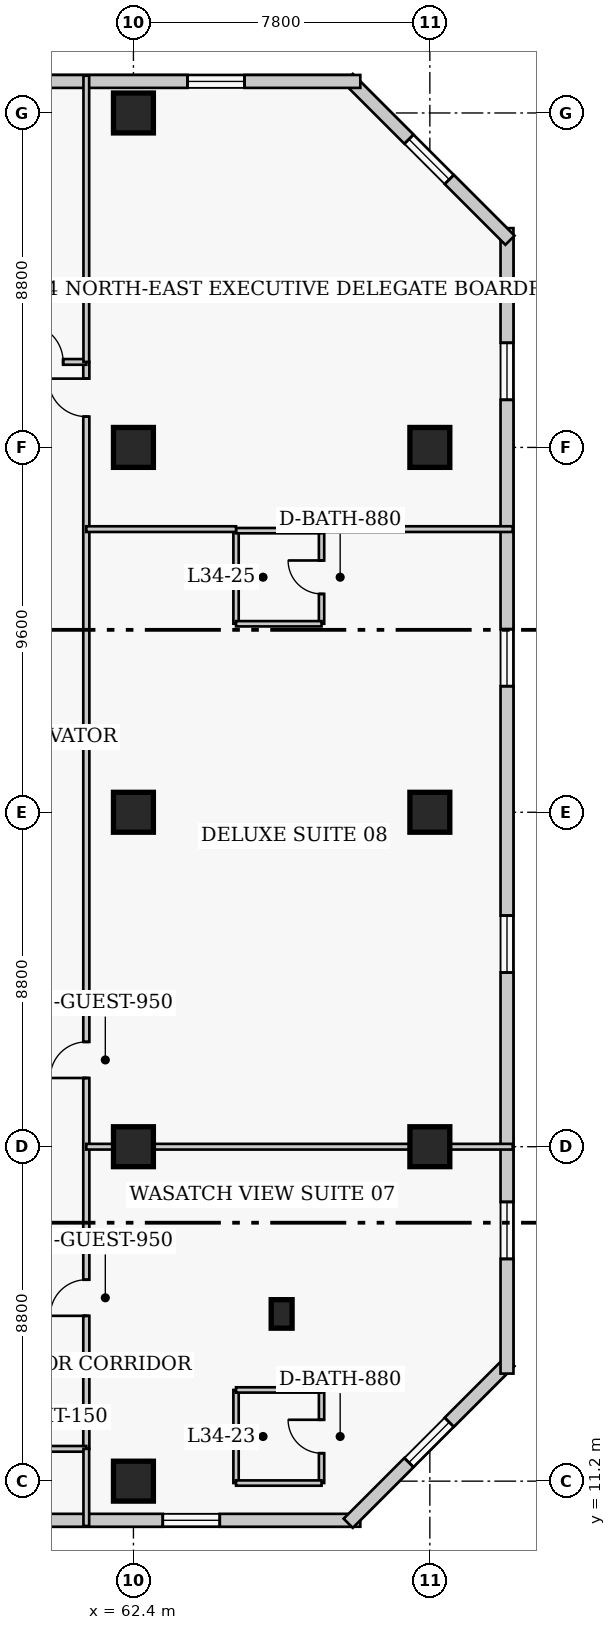
"""IFC4 building model, lengths in metres.
Left out: names, types, materials, properties, quantities, classifications, styles, units other than length and angle.
Written with IfcOpenShell. Run it as: python <this file> out.ifc"""

import sys

from ifc_helpers import new_model, si_unit, direction, frame, frame_2d, origin, origin_2d, place, context, subcontext, project, spatial, rectangle, extrude, element, fill, save


model = new_model("IFC4")
c1 = context("Model", 3, precision=1e-05, world=origin(), true_north=direction((0.0, 1.0)))
c2 = subcontext(c1, "Body", "Model", "MODEL_VIEW")
j1 = project(units=[si_unit("LENGTHUNIT", "METRE"), si_unit("PLANEANGLEUNIT", "RADIAN")], contexts=[c1])
p1 = place(None, origin())
s1 = spatial("IfcSite", under=j1, at=p1, CompositionType="ELEMENT")
p2 = place(p1, origin())
s2 = spatial("IfcBuilding", under=s1, at=p2, CompositionType="ELEMENT")
p3 = place(p2, frame((0.0, 0.0, 138.4)))
s3 = spatial("IfcBuildingStorey", under=s2, at=p3, CompositionType="ELEMENT", Elevation=138.4)
for number, where, z_axis, x_axis in (
    (1, (62.4, 11.2, 0.0), (0.0, 0.0, 1.0), (1.0, 0.0, 0.0)),
    (2, (62.4, 20.0, 0.0), (0.0, 0.0, 1.0), (1.0, 0.0, 0.0)),
    (3, (62.4, 28.8, 0.0), (0.0, 0.0, 1.0), (1.0, 0.0, 0.0)),
    (4, (62.4, 38.4, 0.0), (0.0, 0.0, 1.0), (1.0, 0.0, 0.0)),
    (5, (62.4, 47.2, 0.0), (0.0, 0.0, 1.0), (1.0, 0.0, 0.0)),
    (6, (70.2, 20.0, 0.0), (0.0, 0.0, 1.0), (1.0, 0.0, 0.0)),
    (7, (70.2, 28.8, 0.0), (0.0, 0.0, 1.0), (1.0, 0.0, 0.0)),
    (8, (70.2, 38.4, 0.0), (0.0, 0.0, 1.0), (1.0, 0.0, 0.0)),
):
    element("IfcColumn", number, at=place(p3, frame(where, z_axis=z_axis, x_axis=x_axis)), inside=s3, PredefinedType="COLUMN", context=c2, shape_type="SweptSolid", body=[
        extrude(rectangle(XDim=1.05, YDim=1.05, at=origin_2d()), origin(), (0.0, 0.0, 1.0), 3.8),
    ])
p4 = place(p3, frame((66.3, 15.6, 0.0), z_axis=(0.0, 0.0, 1.0), x_axis=(1.0, 0.0, 0.0)))
e9 = element("IfcColumn", 9, at=p4, inside=s3, PredefinedType="PILASTER", context=c2, shape_type="SweptSolid", body=[
    extrude(rectangle(XDim=0.55, YDim=0.75, at=origin_2d()), origin(), (0.0, 0.0, 1.0), 3.8),
])
p5 = place(p3, frame((41.68, 10.17, 0.0), z_axis=(0.0, 0.0, 1.0), x_axis=(1.0, 0.0, 0.0)))
e10 = element("IfcWall", 10, at=p5, inside=s3, PredefinedType="SOLIDWALL", context=c2, shape_type="SweptSolid", body=[
    extrude(rectangle(XDim=26.69, YDim=0.34, at=frame_2d((13.345, 0.0))), origin(), (0.0, 0.0, 1.0), 3.55),
])
p6 = place(p5, frame((2.548, 0.0, 0.85)))
e11 = element("IfcOpeningElement", 11, at=p6, cuts=e10, PredefinedType="OPENING", context=c2, shape_type="SweptSolid", body=[
    extrude(rectangle(XDim=1.5, YDim=1.75, at=frame_2d((0.75, 0.875))), frame((0.0, 0.18, 0.0), z_axis=(0.0, -1.0, 0.0), x_axis=(1.0, 0.0, 0.0)), (0.0, 0.0, 1.0), 0.36),
])
p7 = place(p5, frame((13.745, 0.0, 0.85)))
e12 = element("IfcOpeningElement", 12, at=p7, cuts=e10, PredefinedType="OPENING", context=c2, shape_type="SweptSolid", body=[
    extrude(rectangle(XDim=1.5, YDim=1.75, at=frame_2d((0.75, 0.875))), frame((0.0, 0.18, 0.0), z_axis=(0.0, -1.0, 0.0), x_axis=(1.0, 0.0, 0.0)), (0.0, 0.0, 1.0), 0.36),
])
p8 = place(p5, frame((21.492, 0.0, 0.85)))
e13 = element("IfcOpeningElement", 13, at=p8, cuts=e10, PredefinedType="OPENING", context=c2, shape_type="SweptSolid", body=[
    extrude(rectangle(XDim=1.5, YDim=1.75, at=frame_2d((0.75, 0.875))), frame((0.0, 0.18, 0.0), z_axis=(0.0, -1.0, 0.0), x_axis=(1.0, 0.0, 0.0)), (0.0, 0.0, 1.0), 0.36),
])
p9 = place(p3, frame((68.052, 10.092, 0.0), z_axis=(0.0, 0.0, 1.0), x_axis=(0.707106781187, 0.707106781187, 0.0)))
e14 = element("IfcWall", 14, at=p9, inside=s3, PredefinedType="SOLIDWALL", context=c2, shape_type="SweptSolid", body=[
    extrude(rectangle(XDim=6.02, YDim=0.34, at=frame_2d((3.01, 0.0))), origin(), (0.0, 0.0, 1.0), 3.55),
])
p10 = place(p9, frame((2.26, 0.0, 0.85)))
e15 = element("IfcOpeningElement", 15, at=p10, cuts=e14, PredefinedType="OPENING", context=c2, shape_type="SweptSolid", body=[
    extrude(rectangle(XDim=1.5, YDim=1.75, at=frame_2d((0.75, 0.875))), frame((0.0, 0.18, 0.0), z_axis=(0.0, -1.0, 0.0), x_axis=(1.0, 0.0, 0.0)), (0.0, 0.0, 1.0), 0.36),
])
p11 = place(p3, frame((72.23, 14.03, 0.0), z_axis=(0.0, 0.0, 1.0), x_axis=(0.0, 1.0, 0.0)))
e16 = element("IfcWall", 16, at=p11, inside=s3, PredefinedType="SOLIDWALL", context=c2, shape_type="SweptSolid", body=[
    extrude(rectangle(XDim=30.14, YDim=0.34, at=frame_2d((15.07, 0.0))), origin(), (0.0, 0.0, 1.0), 3.55),
])
p12 = place(p11, frame((3.018, 0.0, 0.85)))
e17 = element("IfcOpeningElement", 17, at=p12, cuts=e16, PredefinedType="OPENING", context=c2, shape_type="SweptSolid", body=[
    extrude(rectangle(XDim=1.5, YDim=1.75, at=frame_2d((0.75, 0.875))), frame((0.0, 0.18, 0.0), z_axis=(0.0, -1.0, 0.0), x_axis=(1.0, 0.0, 0.0)), (0.0, 0.0, 1.0), 0.36),
])
p13 = place(p11, frame((10.552, 0.0, 0.85)))
e18 = element("IfcOpeningElement", 18, at=p13, cuts=e16, PredefinedType="OPENING", context=c2, shape_type="SweptSolid", body=[
    extrude(rectangle(XDim=1.5, YDim=1.75, at=frame_2d((0.75, 0.875))), frame((0.0, 0.18, 0.0), z_axis=(0.0, -1.0, 0.0), x_axis=(1.0, 0.0, 0.0)), (0.0, 0.0, 1.0), 0.36),
])
p14 = place(p11, frame((18.087, 0.0, 0.85)))
e19 = element("IfcOpeningElement", 19, at=p14, cuts=e16, PredefinedType="OPENING", context=c2, shape_type="SweptSolid", body=[
    extrude(rectangle(XDim=1.5, YDim=1.75, at=frame_2d((0.75, 0.875))), frame((0.0, 0.18, 0.0), z_axis=(0.0, -1.0, 0.0), x_axis=(1.0, 0.0, 0.0)), (0.0, 0.0, 1.0), 0.36),
])
p15 = place(p11, frame((25.623, 0.0, 0.85)))
e20 = element("IfcOpeningElement", 20, at=p15, cuts=e16, PredefinedType="OPENING", context=c2, shape_type="SweptSolid", body=[
    extrude(rectangle(XDim=1.5, YDim=1.75, at=frame_2d((0.75, 0.875))), frame((0.0, 0.18, 0.0), z_axis=(0.0, -1.0, 0.0), x_axis=(1.0, 0.0, 0.0)), (0.0, 0.0, 1.0), 0.36),
])
p16 = place(p3, frame((72.308, 43.852, 0.0), z_axis=(0.0, 0.0, 1.0), x_axis=(-0.707106781187, 0.707106781187, 0.0)))
e21 = element("IfcWall", 21, at=p16, inside=s3, PredefinedType="SOLIDWALL", context=c2, shape_type="SweptSolid", body=[
    extrude(rectangle(XDim=6.02, YDim=0.34, at=frame_2d((3.01, 0.0))), origin(), (0.0, 0.0, 1.0), 3.55),
])
p17 = place(p16, frame((2.26, 0.0, 0.85)))
e22 = element("IfcOpeningElement", 22, at=p17, cuts=e21, PredefinedType="OPENING", context=c2, shape_type="SweptSolid", body=[
    extrude(rectangle(XDim=1.5, YDim=1.75, at=frame_2d((0.75, 0.875))), frame((0.0, 0.18, 0.0), z_axis=(0.0, -1.0, 0.0), x_axis=(1.0, 0.0, 0.0)), (0.0, 0.0, 1.0), 0.36),
])
p18 = place(p3, frame((68.37, 48.03, 0.0), z_axis=(0.0, 0.0, 1.0), x_axis=(-1.0, 0.0, 0.0)))
e23 = element("IfcWall", 23, at=p18, inside=s3, PredefinedType="SOLIDWALL", context=c2, shape_type="SweptSolid", body=[
    extrude(rectangle(XDim=26.69, YDim=0.34, at=frame_2d((13.345, 0.0))), origin(), (0.0, 0.0, 1.0), 3.55),
])
p19 = place(p18, frame((3.048, 0.0, 0.85)))
e24 = element("IfcOpeningElement", 24, at=p19, cuts=e23, PredefinedType="OPENING", context=c2, shape_type="SweptSolid", body=[
    extrude(rectangle(XDim=1.5, YDim=1.75, at=frame_2d((0.75, 0.875))), frame((0.0, 0.18, 0.0), z_axis=(0.0, -1.0, 0.0), x_axis=(1.0, 0.0, 0.0)), (0.0, 0.0, 1.0), 0.36),
])
p20 = place(p18, frame((11.445, 0.0, 0.85)))
e25 = element("IfcOpeningElement", 25, at=p20, cuts=e23, PredefinedType="OPENING", context=c2, shape_type="SweptSolid", body=[
    extrude(rectangle(XDim=1.5, YDim=1.75, at=frame_2d((0.75, 0.875))), frame((0.0, 0.18, 0.0), z_axis=(0.0, -1.0, 0.0), x_axis=(1.0, 0.0, 0.0)), (0.0, 0.0, 1.0), 0.36),
])
p21 = place(p18, frame((22.642, 0.0, 0.85)))
e26 = element("IfcOpeningElement", 26, at=p21, cuts=e23, PredefinedType="OPENING", context=c2, shape_type="SweptSolid", body=[
    extrude(rectangle(XDim=1.5, YDim=1.75, at=frame_2d((0.75, 0.875))), frame((0.0, 0.18, 0.0), z_axis=(0.0, -1.0, 0.0), x_axis=(1.0, 0.0, 0.0)), (0.0, 0.0, 1.0), 0.36),
])
p22 = place(p3, frame((61.16, 12.05, 0.0), z_axis=(0.0, 0.0, 1.0), x_axis=(0.0, 1.0, 0.0)))
e27 = element("IfcWall", 27, at=p22, inside=s3, PredefinedType="PARTITIONING", context=c2, shape_type="SweptSolid", body=[
    extrude(rectangle(XDim=28.6, YDim=0.16, at=frame_2d((14.3, 0.0))), origin(), (0.0, 0.0, 1.0), 3.55),
])
p23 = place(p22, frame((3.5, 0.0, 0.0)))
e28 = element("IfcOpeningElement", 28, at=p23, cuts=e27, PredefinedType="OPENING", context=c2, shape_type="SweptSolid", body=[
    extrude(rectangle(XDim=0.95, YDim=2.1, at=frame_2d((0.475, 1.05))), frame((0.0, 0.09, 0.0), z_axis=(0.0, -1.0, 0.0), x_axis=(1.0, 0.0, 0.0)), (0.0, 0.0, 1.0), 0.18),
])
p24 = place(p22, frame((9.758, 0.0, 0.0)))
e29 = element("IfcOpeningElement", 29, at=p24, cuts=e27, PredefinedType="OPENING", context=c2, shape_type="SweptSolid", body=[
    extrude(rectangle(XDim=0.95, YDim=2.1, at=frame_2d((0.475, 1.05))), frame((0.0, 0.09, 0.0), z_axis=(0.0, -1.0, 0.0), x_axis=(1.0, 0.0, 0.0)), (0.0, 0.0, 1.0), 0.18),
])
p25 = place(p22, frame((27.16, 0.0, 0.0)))
e30 = element("IfcOpeningElement", 30, at=p25, cuts=e27, PredefinedType="OPENING", context=c2, shape_type="SweptSolid", body=[
    extrude(rectangle(XDim=1.0, YDim=2.15, at=frame_2d((0.5, 1.075))), frame((0.0, 0.09, 0.0), z_axis=(0.0, -1.0, 0.0), x_axis=(1.0, 0.0, 0.0)), (0.0, 0.0, 1.0), 0.18),
])
p26 = place(p3, frame((58.94, 12.05, 0.0), z_axis=(0.0, 0.0, 1.0), x_axis=(1.0, 0.0, 0.0)))
e31 = element("IfcWall", 31, at=p26, inside=s3, PredefinedType="PARTITIONING", context=c2, shape_type="SweptSolid", body=[
    extrude(rectangle(XDim=2.22, YDim=0.15, at=frame_2d((1.11, 0.0))), origin(), (0.0, 0.0, 1.0), 3.55),
])
p27 = place(p3, frame((56.8, 40.65, 0.0), z_axis=(0.0, 0.0, 1.0), x_axis=(1.0, 0.0, 0.0)))
e32 = element("IfcWall", 32, at=p27, inside=s3, PredefinedType="PARTITIONING", context=c2, shape_type="SweptSolid", body=[
    extrude(rectangle(XDim=4.36, YDim=0.15, at=frame_2d((2.18, 0.0))), origin(), (0.0, 0.0, 1.0), 3.55),
])
p28 = place(p27, frame((2.75, 0.0, 0.0)))
e33 = element("IfcOpeningElement", 33, at=p28, cuts=e32, PredefinedType="OPENING", context=c2, shape_type="SweptSolid", body=[
    extrude(rectangle(XDim=1.0, YDim=2.15, at=frame_2d((0.5, 1.075))), frame((0.0, 0.085, 0.0), z_axis=(0.0, -1.0, 0.0), x_axis=(1.0, 0.0, 0.0)), (0.0, 0.0, 1.0), 0.17),
])
p29 = place(p3, frame((61.16, 40.65, 0.0), z_axis=(0.0, 0.0, 1.0), x_axis=(0.0, 1.0, 0.0)))
e34 = element("IfcWall", 34, at=p29, inside=s3, PredefinedType="PARTITIONING", context=c2, shape_type="SweptSolid", body=[
    extrude(rectangle(XDim=7.53, YDim=0.15, at=frame_2d((3.765, 0.0))), origin(), (0.0, 0.0, 1.0), 3.55),
])
p30 = place(p3, frame((61.16, 10.02, 0.0), z_axis=(0.0, 0.0, 1.0), x_axis=(0.0, 1.0, 0.0)))
e35 = element("IfcWall", 35, at=p30, inside=s3, PredefinedType="PARTITIONING", context=c2, shape_type="SweptSolid", body=[
    extrude(rectangle(XDim=2.03, YDim=0.15, at=frame_2d((1.015, 0.0))), origin(), (0.0, 0.0, 1.0), 3.55),
])
p31 = place(p3, frame((65.1, 11.15, 0.0), z_axis=(0.0, 0.0, 1.0), x_axis=(0.0, 1.0, 0.0)))
e36 = element("IfcWall", 36, at=p31, inside=s3, PredefinedType="PLUMBINGWALL", context=c2, shape_type="SweptSolid", body=[
    extrude(rectangle(XDim=2.45, YDim=0.14, at=frame_2d((1.225, 0.0))), origin(), (0.0, 0.0, 1.0), 3.55),
])
p32 = place(p3, frame((67.35, 11.15, 0.0), z_axis=(0.0, 0.0, 1.0), x_axis=(0.0, 1.0, 0.0)))
e37 = element("IfcWall", 37, at=p32, inside=s3, PredefinedType="PLUMBINGWALL", context=c2, shape_type="SweptSolid", body=[
    extrude(rectangle(XDim=2.45, YDim=0.14, at=frame_2d((1.225, 0.0))), origin(), (0.0, 0.0, 1.0), 3.55),
])
p33 = place(p32, frame((0.785, 0.0, 0.0)))
e38 = element("IfcOpeningElement", 38, at=p33, cuts=e37, PredefinedType="OPENING", context=c2, shape_type="SweptSolid", body=[
    extrude(rectangle(XDim=0.88, YDim=2.05, at=frame_2d((0.44, 1.025))), frame((0.0, 0.08, 0.0), z_axis=(0.0, -1.0, 0.0), x_axis=(1.0, 0.0, 0.0)), (0.0, 0.0, 1.0), 0.16),
])
for number, where, z_axis, x_axis in (
    (39, (65.1, 11.15, 0.0), (0.0, 0.0, 1.0), (1.0, 0.0, 0.0)),
    (40, (65.1, 13.6, 0.0), (0.0, 0.0, 1.0), (1.0, 0.0, 0.0)),
):
    element("IfcWall", number, at=place(p3, frame(where, z_axis=z_axis, x_axis=x_axis)), inside=s3, PredefinedType="PLUMBINGWALL", context=c2, shape_type="SweptSolid", body=[
        extrude(rectangle(XDim=2.25, YDim=0.14, at=frame_2d((1.125, 0.0))), origin(), (0.0, 0.0, 1.0), 3.55),
    ])
p34 = place(p3, frame((61.16, 20.0, 0.0), z_axis=(0.0, 0.0, 1.0), x_axis=(1.0, 0.0, 0.0)))
e41 = element("IfcWall", 41, at=p34, inside=s3, PredefinedType="PARTITIONING", context=c2, shape_type="SweptSolid", body=[
    extrude(rectangle(XDim=11.22, YDim=0.15, at=frame_2d((5.61, 0.0))), origin(), (0.0, 0.0, 1.0), 2.778),
])
p35 = place(p3, frame((65.1, 33.76, 0.0), z_axis=(0.0, 0.0, 1.0), x_axis=(0.0, 1.0, 0.0)))
e42 = element("IfcWall", 42, at=p35, inside=s3, PredefinedType="PLUMBINGWALL", context=c2, shape_type="SweptSolid", body=[
    extrude(rectangle(XDim=2.45, YDim=0.14, at=frame_2d((1.225, 0.0))), origin(), (0.0, 0.0, 1.0), 3.55),
])
p36 = place(p3, frame((67.35, 33.76, 0.0), z_axis=(0.0, 0.0, 1.0), x_axis=(0.0, 1.0, 0.0)))
e43 = element("IfcWall", 43, at=p36, inside=s3, PredefinedType="PLUMBINGWALL", context=c2, shape_type="SweptSolid", body=[
    extrude(rectangle(XDim=2.45, YDim=0.14, at=frame_2d((1.225, 0.0))), origin(), (0.0, 0.0, 1.0), 3.55),
])
p37 = place(p36, frame((0.785, 0.0, 0.0)))
e44 = element("IfcOpeningElement", 44, at=p37, cuts=e43, PredefinedType="OPENING", context=c2, shape_type="SweptSolid", body=[
    extrude(rectangle(XDim=0.88, YDim=2.05, at=frame_2d((0.44, 1.025))), frame((0.0, 0.08, 0.0), z_axis=(0.0, -1.0, 0.0), x_axis=(1.0, 0.0, 0.0)), (0.0, 0.0, 1.0), 0.16),
])
for number, where, z_axis, x_axis in (
    (45, (65.1, 33.76, 0.0), (0.0, 0.0, 1.0), (1.0, 0.0, 0.0)),
    (46, (65.1, 36.21, 0.0), (0.0, 0.0, 1.0), (1.0, 0.0, 0.0)),
):
    element("IfcWall", number, at=place(p3, frame(where, z_axis=z_axis, x_axis=x_axis)), inside=s3, PredefinedType="PLUMBINGWALL", context=c2, shape_type="SweptSolid", body=[
        extrude(rectangle(XDim=2.25, YDim=0.14, at=frame_2d((1.125, 0.0))), origin(), (0.0, 0.0, 1.0), 3.55),
    ])
p38 = place(p3, frame((61.16, 36.25, 0.0), z_axis=(0.0, 0.0, 1.0), x_axis=(1.0, 0.0, 0.0)))
e47 = element("IfcWall", 47, at=p38, inside=s3, PredefinedType="PARTITIONING", context=c2, shape_type="SweptSolid", body=[
    extrude(rectangle(XDim=3.94, YDim=0.15, at=frame_2d((1.97, 0.0))), origin(), (0.0, 0.0, 1.0), 3.55),
])
p39 = place(p3, frame((67.35, 36.25, 0.0), z_axis=(0.0, 0.0, 1.0), x_axis=(1.0, 0.0, 0.0)))
e48 = element("IfcWall", 48, at=p39, inside=s3, PredefinedType="PARTITIONING", context=c2, shape_type="SweptSolid", body=[
    extrude(rectangle(XDim=5.03, YDim=0.15, at=frame_2d((2.515, 0.0))), origin(), (0.0, 0.0, 1.0), 3.55),
])
p40 = place(p8, origin())
e49 = element("IfcWindow", 49, at=p40, inside=s3, PartitioningType="SINGLE_PANEL", PredefinedType="WINDOW", context=c2, shape_type="SweptSolid", body=[
    extrude(rectangle(XDim=1.5, YDim=1.75, at=frame_2d((0.75, 0.875))), frame((0.0, 0.03, 0.0), z_axis=(0.0, -1.0, 0.0), x_axis=(1.0, 0.0, 0.0)), (0.0, 0.0, 1.0), 0.06),
])
fill(e13, e49)
p41 = place(p10, origin())
e50 = element("IfcWindow", 50, at=p41, inside=s3, PartitioningType="SINGLE_PANEL", PredefinedType="WINDOW", context=c2, shape_type="SweptSolid", body=[
    extrude(rectangle(XDim=1.5, YDim=1.75, at=frame_2d((0.75, 0.875))), frame((0.0, 0.03, 0.0), z_axis=(0.0, -1.0, 0.0), x_axis=(1.0, 0.0, 0.0)), (0.0, 0.0, 1.0), 0.06),
])
fill(e15, e50)
p42 = place(p12, origin())
e51 = element("IfcWindow", 51, at=p42, inside=s3, PartitioningType="SINGLE_PANEL", PredefinedType="WINDOW", context=c2, shape_type="SweptSolid", body=[
    extrude(rectangle(XDim=1.5, YDim=1.75, at=frame_2d((0.75, 0.875))), frame((0.0, 0.03, 0.0), z_axis=(0.0, -1.0, 0.0), x_axis=(1.0, 0.0, 0.0)), (0.0, 0.0, 1.0), 0.06),
])
fill(e17, e51)
p43 = place(p13, origin())
e52 = element("IfcWindow", 52, at=p43, inside=s3, PartitioningType="SINGLE_PANEL", PredefinedType="WINDOW", context=c2, shape_type="SweptSolid", body=[
    extrude(rectangle(XDim=1.5, YDim=1.75, at=frame_2d((0.75, 0.875))), frame((0.0, 0.03, 0.0), z_axis=(0.0, -1.0, 0.0), x_axis=(1.0, 0.0, 0.0)), (0.0, 0.0, 1.0), 0.06),
])
fill(e18, e52)
p44 = place(p14, origin())
e53 = element("IfcWindow", 53, at=p44, inside=s3, PartitioningType="SINGLE_PANEL", PredefinedType="WINDOW", context=c2, shape_type="SweptSolid", body=[
    extrude(rectangle(XDim=1.5, YDim=1.75, at=frame_2d((0.75, 0.875))), frame((0.0, 0.03, 0.0), z_axis=(0.0, -1.0, 0.0), x_axis=(1.0, 0.0, 0.0)), (0.0, 0.0, 1.0), 0.06),
])
fill(e19, e53)
p45 = place(p15, origin())
e54 = element("IfcWindow", 54, at=p45, inside=s3, PartitioningType="SINGLE_PANEL", PredefinedType="WINDOW", context=c2, shape_type="SweptSolid", body=[
    extrude(rectangle(XDim=1.5, YDim=1.75, at=frame_2d((0.75, 0.875))), frame((0.0, 0.03, 0.0), z_axis=(0.0, -1.0, 0.0), x_axis=(1.0, 0.0, 0.0)), (0.0, 0.0, 1.0), 0.06),
])
fill(e20, e54)
p46 = place(p17, origin())
e55 = element("IfcWindow", 55, at=p46, inside=s3, PartitioningType="SINGLE_PANEL", PredefinedType="WINDOW", context=c2, shape_type="SweptSolid", body=[
    extrude(rectangle(XDim=1.5, YDim=1.75, at=frame_2d((0.75, 0.875))), frame((0.0, 0.03, 0.0), z_axis=(0.0, -1.0, 0.0), x_axis=(1.0, 0.0, 0.0)), (0.0, 0.0, 1.0), 0.06),
])
fill(e22, e55)
p47 = place(p19, origin())
e56 = element("IfcWindow", 56, at=p47, inside=s3, PartitioningType="SINGLE_PANEL", PredefinedType="WINDOW", context=c2, shape_type="SweptSolid", body=[
    extrude(rectangle(XDim=1.5, YDim=1.75, at=frame_2d((0.75, 0.875))), frame((0.0, 0.03, 0.0), z_axis=(0.0, -1.0, 0.0), x_axis=(1.0, 0.0, 0.0)), (0.0, 0.0, 1.0), 0.06),
])
fill(e24, e56)
p48 = place(p28, origin())
e57 = element("IfcDoor", 57, at=p48, inside=s3, OperationType="SINGLE_SWING_LEFT", PredefinedType="DOOR", context=c2, shape_type="SweptSolid", body=[
    extrude(rectangle(XDim=1.0, YDim=2.15, at=frame_2d((0.5, 1.075))), frame((0.0, 0.025, 0.0), z_axis=(0.0, -1.0, 0.0), x_axis=(1.0, 0.0, 0.0)), (0.0, 0.0, 1.0), 0.05),
])
fill(e33, e57)
p49 = place(p33, origin())
e58 = element("IfcDoor", 58, at=p49, inside=s3, OperationType="SINGLE_SWING_RIGHT", PredefinedType="DOOR", context=c2, shape_type="SweptSolid", body=[
    extrude(rectangle(XDim=0.88, YDim=2.05, at=frame_2d((0.44, 1.025))), frame((0.0, 0.025, 0.0), z_axis=(0.0, -1.0, 0.0), x_axis=(1.0, 0.0, 0.0)), (0.0, 0.0, 1.0), 0.05),
])
fill(e38, e58)
p50 = place(p23, origin())
e59 = element("IfcDoor", 59, at=p50, inside=s3, OperationType="SINGLE_SWING_LEFT", PredefinedType="DOOR", context=c2, shape_type="SweptSolid", body=[
    extrude(rectangle(XDim=0.95, YDim=2.1, at=frame_2d((0.475, 1.05))), frame((0.0, 0.025, 0.0), z_axis=(0.0, -1.0, 0.0), x_axis=(1.0, 0.0, 0.0)), (0.0, 0.0, 1.0), 0.05),
])
fill(e28, e59)
p51 = place(p37, origin())
e60 = element("IfcDoor", 60, at=p51, inside=s3, OperationType="SINGLE_SWING_RIGHT", PredefinedType="DOOR", context=c2, shape_type="SweptSolid", body=[
    extrude(rectangle(XDim=0.88, YDim=2.05, at=frame_2d((0.44, 1.025))), frame((0.0, 0.025, 0.0), z_axis=(0.0, -1.0, 0.0), x_axis=(1.0, 0.0, 0.0)), (0.0, 0.0, 1.0), 0.05),
])
fill(e44, e60)
p52 = place(p24, origin())
e61 = element("IfcDoor", 61, at=p52, inside=s3, OperationType="SINGLE_SWING_LEFT", PredefinedType="DOOR", context=c2, shape_type="SweptSolid", body=[
    extrude(rectangle(XDim=0.95, YDim=2.1, at=frame_2d((0.475, 1.05))), frame((0.0, 0.025, 0.0), z_axis=(0.0, -1.0, 0.0), x_axis=(1.0, 0.0, 0.0)), (0.0, 0.0, 1.0), 0.05),
])
fill(e29, e61)
p53 = place(p25, origin())
e62 = element("IfcDoor", 62, at=p53, inside=s3, OperationType="SINGLE_SWING_RIGHT", PredefinedType="DOOR", context=c2, shape_type="SweptSolid", body=[
    extrude(rectangle(XDim=1.0, YDim=2.15, at=frame_2d((0.5, 1.075))), frame((0.0, 0.025, 0.0), z_axis=(0.0, -1.0, 0.0), x_axis=(1.0, 0.0, 0.0)), (0.0, 0.0, 1.0), 0.05),
])
fill(e30, e62)
save(model, sys.argv[1])
